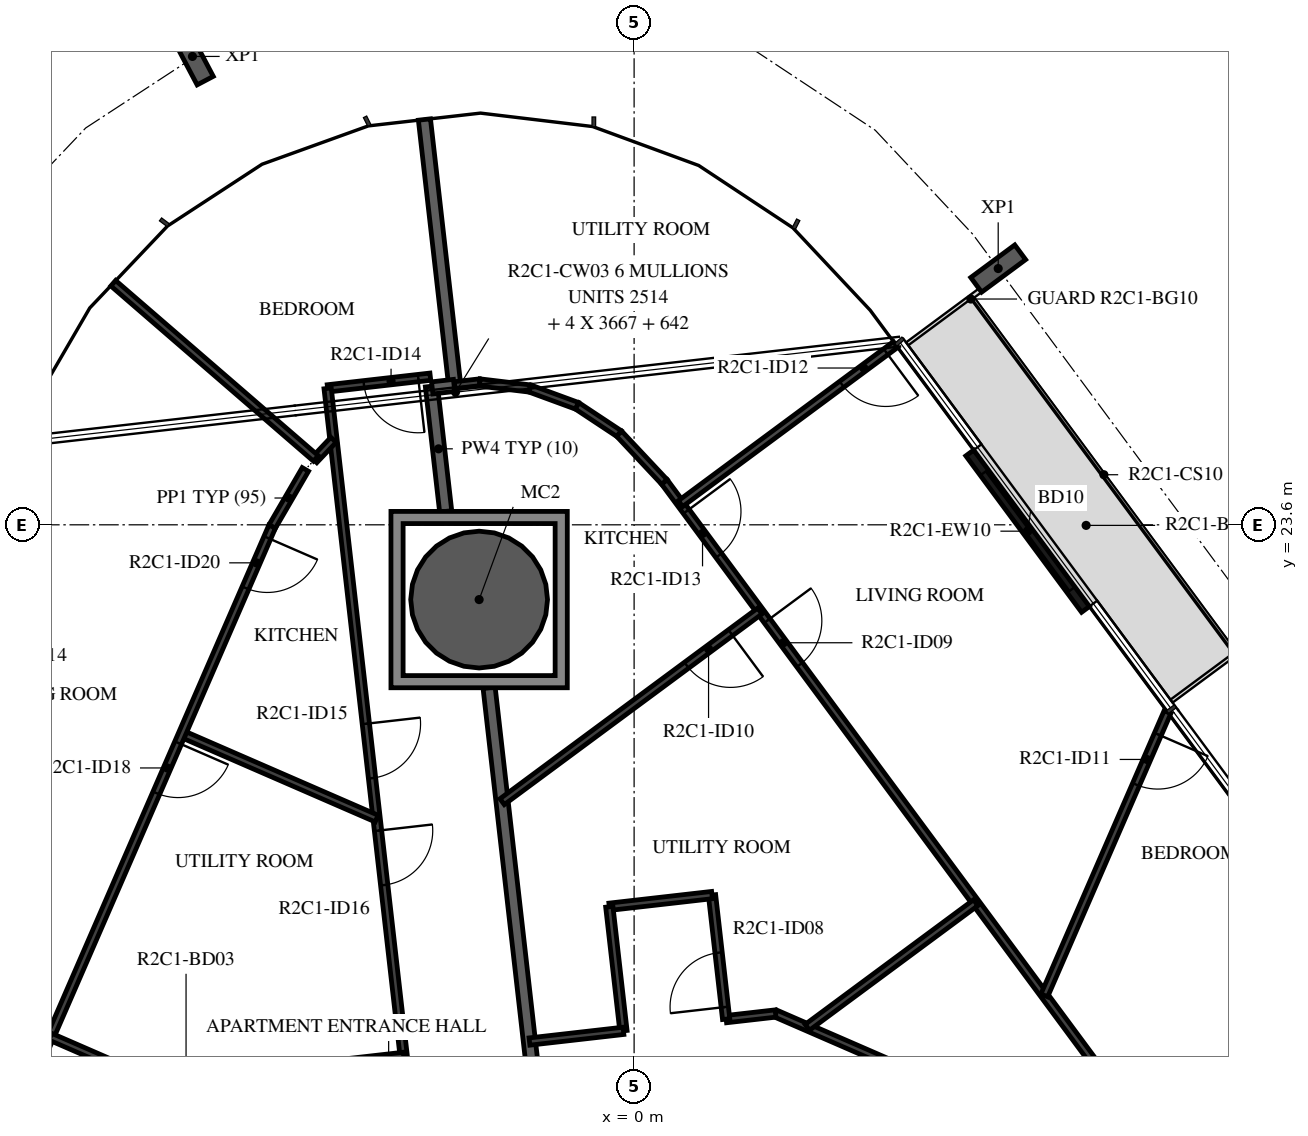
"""IFC4 building model, lengths in metres.
Left out: names, types, materials, properties, quantities, classifications, styles, units other than length and angle.
Written with IfcOpenShell. Run it as: python <this file> out.ifc"""

import sys

from ifc_helpers import new_model, si_unit, direction, frame, frame_2d, origin, origin_2d, place, context, subcontext, project, spatial, polyline, rectangle, hollow_circle, i_section, outline, extrude, element, fill, save


model = new_model("IFC4")
c1 = context("Model", 3, precision=1e-05, world=origin(), true_north=direction((0.0, 1.0)))
c2 = subcontext(c1, "Body", "Model", "MODEL_VIEW")
j1 = project(units=[si_unit("LENGTHUNIT", "METRE"), si_unit("PLANEANGLEUNIT", "RADIAN")], contexts=[c1])
p1 = place(None, origin())
s1 = spatial("IfcSite", under=j1, at=p1, CompositionType="ELEMENT")
p2 = place(p1, origin())
s2 = spatial("IfcBuilding", under=s1, at=p2, CompositionType="ELEMENT")
p3 = place(p2, frame((0.0, 0.0, 101.2)))
s3 = spatial("IfcBuildingStorey", under=s2, at=p3, CompositionType="ELEMENT", Elevation=101.2)
p4 = place(p3, frame((-2.549, 22.37, -0.38), z_axis=(0.0, 0.0, 1.0), x_axis=(1.0, 0.0, 0.0)))
e1 = element("IfcColumn", 1, at=p4, inside=s3, PredefinedType="COLUMN", context=c2, shape_type="SweptSolid", body=[
    extrude(hollow_circle(Radius=1.125, WallThickness=0.055, at=origin_2d()), origin(), (0.0, 0.0, 1.0), 3.5),
])
for number, where, z_axis, x_axis in (
    (2, (5.988, 27.814, -0.38), (0.0, 0.0, 1.0), (0.595, -0.804, 0.0)),
    (3, (-7.263, 31.302, -0.38), (0.0, 0.0, 1.0), (0.884, 0.467, 0.0)),
):
    element("IfcColumn", number, at=place(p3, frame(where, z_axis=z_axis, x_axis=x_axis)), inside=s3, PredefinedType="COLUMN", context=c2, shape_type="SweptSolid", body=[
        extrude(i_section(OverallWidth=0.3, OverallDepth=0.9, WebThickness=0.019, FlangeThickness=0.035, FilletRadius=0.03, at=origin_2d()), origin(), (0.0, 0.0, 1.0), 3.5),
    ])
p5 = place(p3, frame((7.423, 22.209, 0.0), z_axis=(0.0, 0.0, 1.0), x_axis=(-0.594811452818, 0.803865247163, 0.0)))
e4 = element("IfcWall", 4, at=p5, inside=s3, PredefinedType="STANDARD", context=c2, shape_type="SweptSolid", body=[
    extrude(rectangle(XDim=3.2, YDim=0.16, at=frame_2d((1.6, 0.0))), origin(), (0.0, 0.0, 1.0), 3.12),
])
p6 = place(p5, frame((0.4, 0.0, 0.0)))
e5 = element("IfcOpeningElement", 5, at=p6, cuts=e4, PredefinedType="OPENING", context=c2, shape_type="SweptSolid", body=[
    extrude(rectangle(XDim=2.4, YDim=2.4, at=frame_2d((1.2, 1.2))), frame((0.0, 0.09, 0.0), z_axis=(0.0, -1.0, 0.0), x_axis=(1.0, 0.0, 0.0)), (0.0, 0.0, 1.0), 0.18),
])
p7 = place(p3, frame((-2.385, 20.92, 0.0), z_axis=(0.0, 0.0, 1.0), x_axis=(0.113177776247, -0.993574753586, 0.0)))
e6 = element("IfcWall", 6, at=p7, inside=s3, PredefinedType="STANDARD", context=c2, shape_type="SweptSolid", body=[
    extrude(rectangle(XDim=7.356, YDim=0.2, at=frame_2d((3.678, 0.0))), origin(), (0.0, 0.0, 1.0), 3.12),
])
p8 = place(p3, frame((-3.448, 30.265, 0.0), z_axis=(0.0, 0.0, 1.0), x_axis=(0.113189797494, -0.993573384176, 0.0)))
e7 = element("IfcWall", 7, at=p8, inside=s3, PredefinedType="STANDARD", context=c2, shape_type="SweptSolid", body=[
    extrude(rectangle(XDim=4.4, YDim=0.2, at=frame_2d((2.2, 0.0))), origin(), (0.0, 0.0, 1.0), 3.12),
])
p9 = place(p3, frame((-3.333, 25.879, 0.0), z_axis=(0.0, 0.0, 1.0), x_axis=(0.113250782095, -0.993566434797, 0.0)))
e8 = element("IfcWall", 8, at=p9, inside=s3, PredefinedType="STANDARD", context=c2, shape_type="SweptSolid", body=[
    extrude(rectangle(XDim=2.072, YDim=0.2, at=frame_2d((1.036, 0.0))), origin(), (0.0, 0.0, 1.0), 3.12),
])
p10 = place(p3, frame((-2.96, 25.892, 0.0), z_axis=(0.0, 0.0, 1.0), x_axis=(-0.993567388358, -0.113242416041, 0.0)))
e9 = element("IfcWall", 9, at=p10, inside=s3, PredefinedType="STANDARD", context=c2, shape_type="SweptSolid", body=[
    extrude(rectangle(XDim=0.362, YDim=0.2, at=frame_2d((0.181, 0.0))), origin(), (0.0, 0.0, 1.0), 3.12),
])
p11 = place(p3, frame((9.796, 12.315, 0.0), z_axis=(0.0, 0.0, 1.0), x_axis=(-0.917059572812, 0.398750222463, 0.0)))
e10 = element("IfcWall", 10, at=p11, inside=s3, PredefinedType="PARTITIONING", context=c2, shape_type="SweptSolid", body=[
    extrude(rectangle(XDim=8.146, YDim=0.12, at=frame_2d((4.073, 0.0))), origin(), (0.0, 0.0, 1.0), 3.12),
])
p12 = place(p11, frame((2.185, 0.0, 0.0)))
e11 = element("IfcOpeningElement", 11, at=p12, cuts=e10, PredefinedType="OPENING", context=c2, shape_type="SweptSolid", body=[
    extrude(rectangle(XDim=0.8, YDim=2.1, at=frame_2d((0.4, 1.05))), frame((0.0, 0.07, 0.0), z_axis=(0.0, -1.0, 0.0), x_axis=(1.0, 0.0, 0.0)), (0.0, 0.0, 1.0), 0.14),
])
p13 = place(p3, frame((2.326, 15.563, 0.0), z_axis=(0.0, 0.0, 1.0), x_axis=(-0.993570169982, -0.113218007944, 0.0)))
e12 = element("IfcWall", 12, at=p13, inside=s3, PredefinedType="PARTITIONING", context=c2, shape_type="SweptSolid", body=[
    extrude(rectangle(XDim=0.817, YDim=0.12, at=frame_2d((0.409, 0.0))), origin(), (0.0, 0.0, 1.0), 3.12),
])
p14 = place(p3, frame((1.514, 15.471, 0.0), z_axis=(0.0, 0.0, 1.0), x_axis=(-0.113301814952, 0.993560616535, 0.0)))
e13 = element("IfcWall", 13, at=p14, inside=s3, PredefinedType="PARTITIONING", context=c2, shape_type="SweptSolid", body=[
    extrude(rectangle(XDim=2.053, YDim=0.12, at=frame_2d((1.027, 0.0))), origin(), (0.0, 0.0, 1.0), 3.12),
])
p15 = place(p14, frame((0.2, 0.0, 0.0)))
e14 = element("IfcOpeningElement", 14, at=p15, cuts=e13, PredefinedType="OPENING", context=c2, shape_type="SweptSolid", body=[
    extrude(rectangle(XDim=0.9, YDim=2.1, at=frame_2d((0.45, 1.05))), frame((0.0, 0.07, 0.0), z_axis=(0.0, -1.0, 0.0), x_axis=(1.0, 0.0, 0.0)), (0.0, 0.0, 1.0), 0.14),
])
p16 = place(p3, frame((1.281, 17.511, 0.0), z_axis=(0.0, 0.0, 1.0), x_axis=(-0.993575191649, -0.113173930474, 0.0)))
e15 = element("IfcWall", 15, at=p16, inside=s3, PredefinedType="PARTITIONING", context=c2, shape_type="SweptSolid", body=[
    extrude(rectangle(XDim=1.7, YDim=0.12, at=frame_2d((0.85, 0.0))), origin(), (0.0, 0.0, 1.0), 3.12),
])
p17 = place(p3, frame((-0.408, 17.319, 0.0), z_axis=(0.0, 0.0, 1.0), x_axis=(0.113184449176, -0.993573993452, 0.0)))
e16 = element("IfcWall", 16, at=p17, inside=s3, PredefinedType="PARTITIONING", context=c2, shape_type="SweptSolid", body=[
    extrude(rectangle(XDim=2.053, YDim=0.12, at=frame_2d((1.027, 0.0))), origin(), (0.0, 0.0, 1.0), 3.12),
])
p18 = place(p3, frame((-0.175, 15.278, 0.0), z_axis=(0.0, 0.0, 1.0), x_axis=(-0.993575604955, -0.113170301923, 0.0)))
e17 = element("IfcWall", 17, at=p18, inside=s3, PredefinedType="PARTITIONING", context=c2, shape_type="SweptSolid", body=[
    extrude(rectangle(XDim=1.555, YDim=0.12, at=frame_2d((0.778, 0.0))), origin(), (0.0, 0.0, 1.0), 3.12),
])
p19 = place(p3, frame((0.498, 24.306, 0.0), z_axis=(0.0, 0.0, 1.0), x_axis=(0.594826122019, -0.803854392639, 0.0)))
e18 = element("IfcWall", 18, at=p19, inside=s3, PredefinedType="PARTITIONING", context=c2, shape_type="SweptSolid", body=[
    extrude(rectangle(XDim=14.576, YDim=0.12, at=frame_2d((7.288, 0.0))), origin(), (0.0, 0.0, 1.0), 3.12),
])
p20 = place(p19, frame((2.841, 0.0, 0.0)))
e19 = element("IfcOpeningElement", 19, at=p20, cuts=e18, PredefinedType="OPENING", context=c2, shape_type="SweptSolid", body=[
    extrude(rectangle(XDim=0.9, YDim=2.1, at=frame_2d((0.45, 1.05))), frame((0.0, 0.07, 0.0), z_axis=(0.0, -1.0, 0.0), x_axis=(1.0, 0.0, 0.0)), (0.0, 0.0, 1.0), 0.14),
])
p21 = place(p19, frame((0.605, 0.0, 0.0)))
e20 = element("IfcOpeningElement", 20, at=p21, cuts=e18, PredefinedType="OPENING", context=c2, shape_type="SweptSolid", body=[
    extrude(rectangle(XDim=0.9, YDim=2.1, at=frame_2d((0.45, 1.05))), frame((0.0, 0.07, 0.0), z_axis=(0.0, -1.0, 0.0), x_axis=(1.0, 0.0, 0.0)), (0.0, 0.0, 1.0), 0.14),
])
p22 = place(p3, frame((8.772, 20.521, 0.0), z_axis=(0.0, 0.0, 1.0), x_axis=(-0.398733139635, -0.917067000473, 0.0)))
e21 = element("IfcWall", 21, at=p22, inside=s3, PredefinedType="PARTITIONING", context=c2, shape_type="SweptSolid", body=[
    extrude(rectangle(XDim=5.081, YDim=0.12, at=frame_2d((2.541, 0.0))), origin(), (0.0, 0.0, 1.0), 3.12),
])
p23 = place(p22, frame((0.4, 0.0, 0.0)))
e22 = element("IfcOpeningElement", 22, at=p23, cuts=e21, PredefinedType="OPENING", context=c2, shape_type="SweptSolid", body=[
    extrude(rectangle(XDim=0.9, YDim=2.1, at=frame_2d((0.45, 1.05))), frame((0.0, 0.07, 0.0), z_axis=(0.0, -1.0, 0.0), x_axis=(1.0, 0.0, 0.0)), (0.0, 0.0, 1.0), 0.14),
])
p24 = place(p3, frame((5.618, 17.386, 0.0), z_axis=(0.0, 0.0, 1.0), x_axis=(-0.803852063114, -0.59482927015, 0.0)))
e23 = element("IfcWall", 23, at=p24, inside=s3, PredefinedType="PARTITIONING", context=c2, shape_type="SweptSolid", body=[
    extrude(rectangle(XDim=3.446, YDim=0.12, at=frame_2d((1.723, 0.0))), origin(), (0.0, 0.0, 1.0), 3.12),
])
p25 = place(p3, frame((4.299, 26.565, 0.0), z_axis=(0.0, 0.0, 1.0), x_axis=(-0.803851981262, -0.594829380764, 0.0)))
e24 = element("IfcWall", 24, at=p25, inside=s3, PredefinedType="PARTITIONING", context=c2, shape_type="SweptSolid", body=[
    extrude(rectangle(XDim=4.4, YDim=0.12, at=frame_2d((2.2, 0.0))), origin(), (0.0, 0.0, 1.0), 2.73),
])
p26 = place(p25, frame((0.2, 0.0, 0.0)))
e25 = element("IfcOpeningElement", 25, at=p26, cuts=e24, PredefinedType="OPENING", context=c2, shape_type="SweptSolid", body=[
    extrude(rectangle(XDim=0.9, YDim=2.1, at=frame_2d((0.45, 1.05))), frame((0.0, 0.07, 0.0), z_axis=(0.0, -1.0, 0.0), x_axis=(1.0, 0.0, 0.0)), (0.0, 0.0, 1.0), 0.14),
])
p27 = place(p3, frame((2.068, 22.183, 0.0), z_axis=(0.0, 0.0, 1.0), x_axis=(-0.803867138365, -0.594808896921, 0.0)))
e26 = element("IfcWall", 26, at=p27, inside=s3, PredefinedType="PARTITIONING", context=c2, shape_type="SweptSolid", body=[
    extrude(rectangle(XDim=5.273, YDim=0.12, at=frame_2d((2.636, 0.0))), origin(), (0.0, 0.0, 1.0), 3.12),
])
p28 = place(p27, frame((0.6, 0.0, 0.0)))
e27 = element("IfcOpeningElement", 27, at=p28, cuts=e26, PredefinedType="OPENING", context=c2, shape_type="SweptSolid", body=[
    extrude(rectangle(XDim=0.9, YDim=2.1, at=frame_2d((0.45, 1.05))), frame((0.0, 0.07, 0.0), z_axis=(0.0, -1.0, 0.0), x_axis=(1.0, 0.0, 0.0)), (0.0, 0.0, 1.0), 0.14),
])
p29 = place(p3, frame((-2.95, 25.893, 0.0), z_axis=(0.0, 0.0, 1.0), x_axis=(0.993519378224, 0.113662857141, 0.0)))
e28 = element("IfcWall", 28, at=p29, inside=s3, PredefinedType="PARTITIONING", context=c2, shape_type="SweptSolid", body=[
    extrude(rectangle(XDim=0.415, YDim=0.12, at=frame_2d((0.207, 0.0))), origin(), (0.0, 0.0, 1.0), 3.12),
])
for number, where, z_axis, x_axis in (
    (29, (-2.538, 25.94, 0.0), (0.0, 0.0, 1.0), (0.993, -0.119, 0.0)),
    (30, (-1.715, 25.842, 0.0), (0.0, 0.0, 1.0), (0.939, -0.345, 0.0)),
    (31, (-0.937, 25.556, 0.0), (0.0, 0.0, 1.0), (0.834, -0.552, 0.0)),
):
    element("IfcWall", number, at=place(p3, frame(where, z_axis=z_axis, x_axis=x_axis)), inside=s3, PredefinedType="PARTITIONING", context=c2, shape_type="SweptSolid", body=[
        extrude(rectangle(XDim=0.829, YDim=0.12, at=frame_2d((0.415, 0.0))), origin(), (0.0, 0.0, 1.0), 3.12),
    ])
p30 = place(p3, frame((-0.246, 25.098, 0.0), z_axis=(0.0, 0.0, 1.0), x_axis=(0.684172712488, -0.729320025426, 0.0)))
e32 = element("IfcWall", 32, at=p30, inside=s3, PredefinedType="PARTITIONING", context=c2, shape_type="SweptSolid", body=[
    extrude(rectangle(XDim=1.087, YDim=0.12, at=frame_2d((0.543, 0.0))), origin(), (0.0, 0.0, 1.0), 3.12),
])
p31 = place(p3, frame((-3.351, 26.036, 0.0), z_axis=(0.0, 0.0, 1.0), x_axis=(-0.993575191649, -0.113173930474, 0.0)))
e33 = element("IfcWall", 33, at=p31, inside=s3, PredefinedType="PARTITIONING", context=c2, shape_type="SweptSolid", body=[
    extrude(rectangle(XDim=1.7, YDim=0.12, at=frame_2d((0.85, 0.0))), origin(), (0.0, 0.0, 1.0), 3.12),
])
p32 = place(p31, frame((0.2, 0.0, 0.0)))
e34 = element("IfcOpeningElement", 34, at=p32, cuts=e33, PredefinedType="OPENING", context=c2, shape_type="SweptSolid", body=[
    extrude(rectangle(XDim=0.9, YDim=2.1, at=frame_2d((0.45, 1.05))), frame((0.0, 0.07, 0.0), z_axis=(0.0, -1.0, 0.0), x_axis=(1.0, 0.0, 0.0)), (0.0, 0.0, 1.0), 0.14),
])
p33 = place(p3, frame((-5.04, 25.844, 0.0), z_axis=(0.0, 0.0, 1.0), x_axis=(0.1132106553, -0.993571007793, 0.0)))
e35 = element("IfcWall", 35, at=p33, inside=s3, PredefinedType="PARTITIONING", context=c2, shape_type="SweptSolid", body=[
    extrude(rectangle(XDim=11.048, YDim=0.12, at=frame_2d((5.524, 0.0))), origin(), (0.0, 0.0, 1.0), 3.12),
])
p34 = place(p33, frame((5.551, 0.0, 0.0)))
e36 = element("IfcOpeningElement", 36, at=p34, cuts=e35, PredefinedType="OPENING", context=c2, shape_type="SweptSolid", body=[
    extrude(rectangle(XDim=0.9, YDim=2.1, at=frame_2d((0.45, 1.05))), frame((0.0, 0.07, 0.0), z_axis=(0.0, -1.0, 0.0), x_axis=(1.0, 0.0, 0.0)), (0.0, 0.0, 1.0), 0.14),
])
p35 = place(p33, frame((7.32, 0.0, 0.0)))
e37 = element("IfcOpeningElement", 37, at=p35, cuts=e35, PredefinedType="OPENING", context=c2, shape_type="SweptSolid", body=[
    extrude(rectangle(XDim=0.9, YDim=2.1, at=frame_2d((0.45, 1.05))), frame((0.0, 0.07, 0.0), z_axis=(0.0, -1.0, 0.0), x_axis=(1.0, 0.0, 0.0)), (0.0, 0.0, 1.0), 0.14),
])
p36 = place(p3, frame((-3.79, 14.867, 0.0), z_axis=(0.0, 0.0, 1.0), x_axis=(-0.993557948123, -0.113325212204, 0.0)))
e38 = element("IfcWall", 38, at=p36, inside=s3, PredefinedType="PARTITIONING", context=c2, shape_type="SweptSolid", body=[
    extrude(rectangle(XDim=1.991, YDim=0.12, at=frame_2d((0.995, 0.0))), origin(), (0.0, 0.0, 1.0), 3.12),
])
p37 = place(p3, frame((-5.261, 24.663, 0.0), z_axis=(0.0, 0.0, 1.0), x_axis=(0.688346106747, 0.725382407648, 0.0)))
e39 = element("IfcWall", 39, at=p37, inside=s3, PredefinedType="PARTITIONING", context=c2, shape_type="SweptSolid", body=[
    extrude(rectangle(XDim=0.461, YDim=0.12, at=frame_2d((0.231, 0.0))), origin(), (0.0, 0.0, 1.0), 3.12),
])
p38 = place(p3, frame((-8.566, 27.573, 0.0), z_axis=(0.0, 0.0, 1.0), x_axis=(0.756463964606, -0.654035373854, 0.0)))
e40 = element("IfcWall", 40, at=p38, inside=s3, PredefinedType="PARTITIONING", context=c2, shape_type="SweptSolid", body=[
    extrude(rectangle(XDim=4.405, YDim=0.12, at=frame_2d((2.202, 0.0))), origin(), (0.0, 0.0, 1.0), 3.12),
])
p39 = place(p3, frame((-7.435, 20.161, 0.0), z_axis=(0.0, 0.0, 1.0), x_axis=(0.917055599503, -0.398759360291, 0.0)))
e41 = element("IfcWall", 41, at=p39, inside=s3, PredefinedType="PARTITIONING", context=c2, shape_type="SweptSolid", body=[
    extrude(rectangle(XDim=3.49, YDim=0.12, at=frame_2d((1.745, 0.0))), origin(), (0.0, 0.0, 1.0), 3.12),
])
p40 = place(p3, frame((-5.406, 24.51, 0.0), z_axis=(0.0, 0.0, 1.0), x_axis=(-0.502487709822, -0.864584351858, 0.0)))
e42 = element("IfcWall", 42, at=p40, inside=s3, PredefinedType="PARTITIONING", context=c2, shape_type="SweptSolid", body=[
    extrude(rectangle(XDim=1.087, YDim=0.12, at=frame_2d((0.543, 0.0))), origin(), (0.0, 0.0, 1.0), 3.12),
])
p41 = place(p3, frame((-5.952, 23.571, 0.0), z_axis=(0.0, 0.0, 1.0), x_axis=(-0.398745097158, -0.917061801348, 0.0)))
e43 = element("IfcWall", 43, at=p41, inside=s3, PredefinedType="PARTITIONING", context=c2, shape_type="SweptSolid", body=[
    extrude(rectangle(XDim=14.576, YDim=0.12, at=frame_2d((7.288, 0.0))), origin(), (0.0, 0.0, 1.0), 3.12),
])
p42 = place(p41, frame((3.878, 0.0, 0.0)))
e44 = element("IfcOpeningElement", 44, at=p42, cuts=e43, PredefinedType="OPENING", context=c2, shape_type="SweptSolid", body=[
    extrude(rectangle(XDim=0.9, YDim=2.1, at=frame_2d((0.45, 1.05))), frame((0.0, 0.07, 0.0), z_axis=(0.0, -1.0, 0.0), x_axis=(1.0, 0.0, 0.0)), (0.0, 0.0, 1.0), 0.14),
])
p43 = place(p41, frame((0.2, 0.0, 0.0)))
e45 = element("IfcOpeningElement", 45, at=p43, cuts=e43, PredefinedType="OPENING", context=c2, shape_type="SweptSolid", body=[
    extrude(rectangle(XDim=0.9, YDim=2.1, at=frame_2d((0.45, 1.05))), frame((0.0, 0.07, 0.0), z_axis=(0.0, -1.0, 0.0), x_axis=(1.0, 0.0, 0.0)), (0.0, 0.0, 1.0), 0.14),
])
p44 = place(p3, frame((-9.6, 15.182, 0.0), z_axis=(0.0, 0.0, 1.0), x_axis=(0.917073771145, -0.398717567054, 0.0)))
e46 = element("IfcWall", 46, at=p44, inside=s3, PredefinedType="PARTITIONING", context=c2, shape_type="SweptSolid", body=[
    extrude(rectangle(XDim=3.135, YDim=0.12, at=frame_2d((1.567, 0.0))), origin(), (0.0, 0.0, 1.0), 3.12),
])
p45 = place(p3, origin())
e47 = element("IfcWall", 47, at=p45, inside=s3, PredefinedType="STANDARD", context=c2, shape_type="SweptSolid", body=[
    extrude(outline(polyline([(-1.099, 23.82), (-1.099, 20.92), (-3.999, 20.92), (-3.999, 23.82), (-1.099, 23.82)]), holes=[polyline([(-3.799, 21.12), (-1.299, 21.12), (-1.299, 23.62), (-3.799, 23.62), (-3.799, 21.12)])]), origin(), (0.0, 0.0, 1.0), 3.12),
])
p46 = place(p6, origin())
e48 = element("IfcDoor", 48, at=p46, inside=s3, OperationType="DOUBLE_DOOR_SLIDING", PredefinedType="DOOR", context=c2, shape_type="SweptSolid", body=[
    extrude(rectangle(XDim=2.4, YDim=2.4, at=frame_2d((1.2, 1.2))), frame((0.0, 0.025, 0.0), z_axis=(0.0, -1.0, 0.0), x_axis=(1.0, 0.0, 0.0)), (0.0, 0.0, 1.0), 0.05),
])
fill(e5, e48)
p47 = place(p15, origin())
e49 = element("IfcDoor", 49, at=p47, inside=s3, OperationType="SINGLE_SWING_RIGHT", PredefinedType="DOOR", context=c2, shape_type="SweptSolid", body=[
    extrude(rectangle(XDim=0.9, YDim=2.1, at=frame_2d((0.45, 1.05))), frame((0.0, 0.025, 0.0), z_axis=(0.0, -1.0, 0.0), x_axis=(1.0, 0.0, 0.0)), (0.0, 0.0, 1.0), 0.05),
])
fill(e14, e49)
p48 = place(p20, origin())
e50 = element("IfcDoor", 50, at=p48, inside=s3, OperationType="SINGLE_SWING_RIGHT", PredefinedType="DOOR", context=c2, shape_type="SweptSolid", body=[
    extrude(rectangle(XDim=0.9, YDim=2.1, at=frame_2d((0.45, 1.05))), frame((0.0, 0.025, 0.0), z_axis=(0.0, -1.0, 0.0), x_axis=(1.0, 0.0, 0.0)), (0.0, 0.0, 1.0), 0.05),
])
fill(e19, e50)
p49 = place(p28, origin())
e51 = element("IfcDoor", 51, at=p49, inside=s3, OperationType="SINGLE_SWING_RIGHT", PredefinedType="DOOR", context=c2, shape_type="SweptSolid", body=[
    extrude(rectangle(XDim=0.9, YDim=2.1, at=frame_2d((0.45, 1.05))), frame((0.0, 0.025, 0.0), z_axis=(0.0, -1.0, 0.0), x_axis=(1.0, 0.0, 0.0)), (0.0, 0.0, 1.0), 0.05),
])
fill(e27, e51)
p50 = place(p23, origin())
e52 = element("IfcDoor", 52, at=p50, inside=s3, OperationType="SINGLE_SWING_LEFT", PredefinedType="DOOR", context=c2, shape_type="SweptSolid", body=[
    extrude(rectangle(XDim=0.9, YDim=2.1, at=frame_2d((0.45, 1.05))), frame((0.0, 0.025, 0.0), z_axis=(0.0, -1.0, 0.0), x_axis=(1.0, 0.0, 0.0)), (0.0, 0.0, 1.0), 0.05),
])
fill(e22, e52)
p51 = place(p26, origin())
e53 = element("IfcDoor", 53, at=p51, inside=s3, OperationType="SINGLE_SWING_RIGHT", PredefinedType="DOOR", context=c2, shape_type="SweptSolid", body=[
    extrude(rectangle(XDim=0.9, YDim=2.1, at=frame_2d((0.45, 1.05))), frame((0.0, 0.025, 0.0), z_axis=(0.0, -1.0, 0.0), x_axis=(1.0, 0.0, 0.0)), (0.0, 0.0, 1.0), 0.05),
])
fill(e25, e53)
p52 = place(p21, origin())
e54 = element("IfcDoor", 54, at=p52, inside=s3, OperationType="SINGLE_SWING_LEFT", PredefinedType="DOOR", context=c2, shape_type="SweptSolid", body=[
    extrude(rectangle(XDim=0.9, YDim=2.1, at=frame_2d((0.45, 1.05))), frame((0.0, 0.025, 0.0), z_axis=(0.0, -1.0, 0.0), x_axis=(1.0, 0.0, 0.0)), (0.0, 0.0, 1.0), 0.05),
])
fill(e20, e54)
p53 = place(p32, origin())
e55 = element("IfcDoor", 55, at=p53, inside=s3, OperationType="SINGLE_SWING_RIGHT", PredefinedType="DOOR", context=c2, shape_type="SweptSolid", body=[
    extrude(rectangle(XDim=0.9, YDim=2.1, at=frame_2d((0.45, 1.05))), frame((0.0, 0.025, 0.0), z_axis=(0.0, -1.0, 0.0), x_axis=(1.0, 0.0, 0.0)), (0.0, 0.0, 1.0), 0.05),
])
fill(e34, e55)
p54 = place(p34, origin())
e56 = element("IfcDoor", 56, at=p54, inside=s3, OperationType="SINGLE_SWING_LEFT", PredefinedType="DOOR", context=c2, shape_type="SweptSolid", body=[
    extrude(rectangle(XDim=0.9, YDim=2.1, at=frame_2d((0.45, 1.05))), frame((0.0, 0.025, 0.0), z_axis=(0.0, -1.0, 0.0), x_axis=(1.0, 0.0, 0.0)), (0.0, 0.0, 1.0), 0.05),
])
fill(e36, e56)
p55 = place(p35, origin())
e57 = element("IfcDoor", 57, at=p55, inside=s3, OperationType="SINGLE_SWING_LEFT", PredefinedType="DOOR", context=c2, shape_type="SweptSolid", body=[
    extrude(rectangle(XDim=0.9, YDim=2.1, at=frame_2d((0.45, 1.05))), frame((0.0, 0.025, 0.0), z_axis=(0.0, -1.0, 0.0), x_axis=(1.0, 0.0, 0.0)), (0.0, 0.0, 1.0), 0.05),
])
fill(e37, e57)
p56 = place(p42, origin())
e58 = element("IfcDoor", 58, at=p56, inside=s3, OperationType="SINGLE_SWING_LEFT", PredefinedType="DOOR", context=c2, shape_type="SweptSolid", body=[
    extrude(rectangle(XDim=0.9, YDim=2.1, at=frame_2d((0.45, 1.05))), frame((0.0, 0.025, 0.0), z_axis=(0.0, -1.0, 0.0), x_axis=(1.0, 0.0, 0.0)), (0.0, 0.0, 1.0), 0.05),
])
fill(e44, e58)
p57 = place(p43, origin())
e59 = element("IfcDoor", 59, at=p57, inside=s3, OperationType="SINGLE_SWING_RIGHT", PredefinedType="DOOR", context=c2, shape_type="SweptSolid", body=[
    extrude(rectangle(XDim=0.9, YDim=2.1, at=frame_2d((0.45, 1.05))), frame((0.0, 0.025, 0.0), z_axis=(0.0, -1.0, 0.0), x_axis=(1.0, 0.0, 0.0)), (0.0, 0.0, 1.0), 0.05),
])
fill(e45, e59)
save(model, sys.argv[1])
